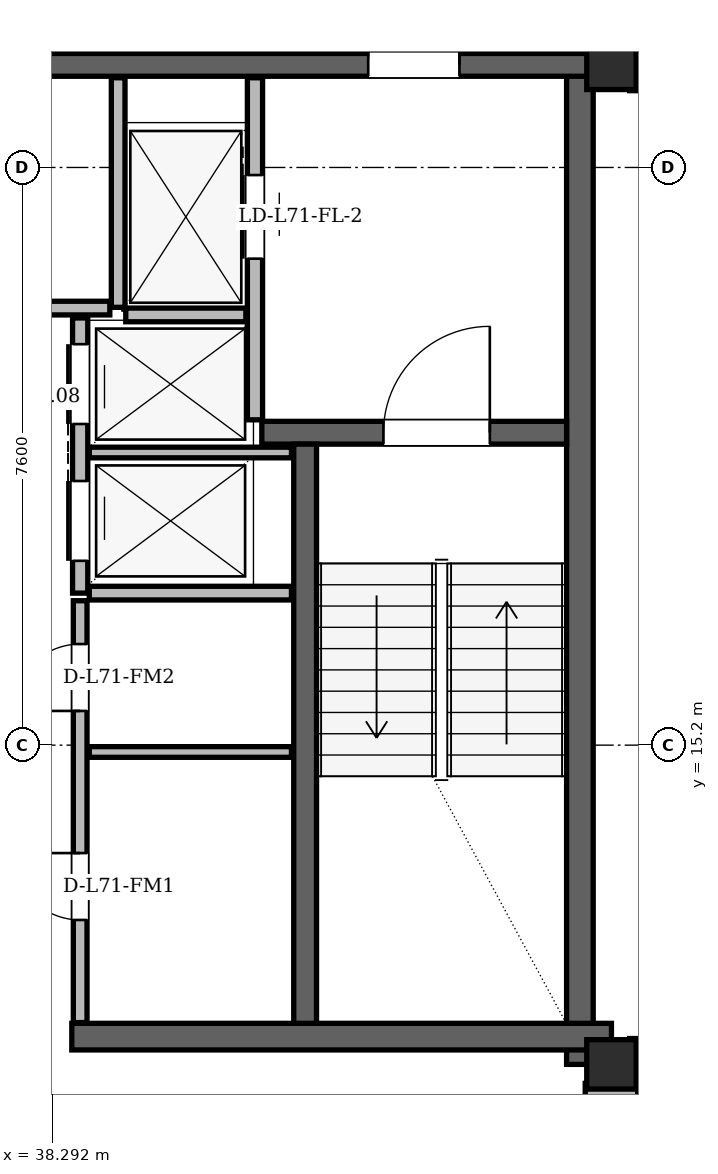
"""IFC4 building model, lengths in metres.
Left out: names, types, materials, properties, quantities, classifications, styles, units other than length and angle.
Written with IfcOpenShell. Run it as: python <this file> out.ifc"""

import sys

from ifc_helpers import new_model, si_unit, direction, frame, frame_2d, origin, origin_2d, place, context, subcontext, project, spatial, rectangle, hollow_rectangle, extrude, element, fill, save


model = new_model("IFC4")
c1 = context("Model", 3, precision=1e-05, world=origin(), true_north=direction((0.0, 1.0)))
c2 = subcontext(c1, "Body", "Model", "MODEL_VIEW")
j1 = project(units=[si_unit("LENGTHUNIT", "METRE"), si_unit("PLANEANGLEUNIT", "RADIAN")], contexts=[c1])
p1 = place(None, origin())
s1 = spatial("IfcSite", under=j1, at=p1, CompositionType="ELEMENT")
p2 = place(p1, origin())
s2 = spatial("IfcBuilding", under=s1, at=p2, CompositionType="ELEMENT")
p3 = place(p2, frame((0.0, 0.0, 269.4)))
s3 = spatial("IfcBuildingStorey", under=s2, at=p3, CompositionType="ELEMENT", Elevation=269.4)
for number, where, z_axis, x_axis in (
    (1, (45.65, 11.0, 0.0), (0.0, 0.0, 1.0), (1.0, 0.0, 0.0)),
    (2, (45.65, 24.15, 0.0), (0.0, 0.0, 1.0), (1.0, 0.0, 0.0)),
):
    element("IfcColumn", number, at=place(p3, frame(where, z_axis=z_axis, x_axis=x_axis)), inside=s3, PredefinedType="COLUMN", context=c2, shape_type="SweptSolid", body=[
        extrude(hollow_rectangle(XDim=0.65, YDim=0.65, WallThickness=0.05, at=origin_2d()), origin(), (0.0, 0.0, 1.0), 3.9),
    ])
p4 = place(p3, frame((45.235, 11.0, 0.0), z_axis=(0.0, 0.0, 1.0), x_axis=(0.0, 1.0, 0.0)))
e3 = element("IfcWall", 3, at=p4, inside=s3, PredefinedType="SHEAR", context=c2, shape_type="SweptSolid", body=[
    extrude(rectangle(XDim=13.3, YDim=0.35, at=frame_2d((6.65, 0.0))), origin(), (0.0, 0.0, 1.0), 3.68),
])
p5 = place(p3, frame((38.55, 11.365, 0.0), z_axis=(0.0, 0.0, 1.0), x_axis=(1.0, 0.0, 0.0)))
e4 = element("IfcWall", 4, at=p5, inside=s3, PredefinedType="SHEAR", context=c2, shape_type="SweptSolid", body=[
    extrude(rectangle(XDim=7.1, YDim=0.35, at=frame_2d((3.55, 0.0))), origin(), (0.0, 0.0, 1.0), 3.68),
])
p6 = place(p3, frame((29.65, 24.15, 0.0), z_axis=(0.0, 0.0, 1.0), x_axis=(1.0, 0.0, 0.0)))
e5 = element("IfcWall", 5, at=p6, inside=s3, PredefinedType="SHEAR", context=c2, shape_type="SweptSolid", body=[
    extrude(rectangle(XDim=15.7, YDim=0.3, at=frame_2d((7.85, 0.0))), origin(), (0.0, 0.0, 1.0), 3.68),
])
p7 = place(p6, frame((1.7, 0.0, 0.0)))
e6 = element("IfcOpeningElement", 6, at=p7, cuts=e5, PredefinedType="OPENING", context=c2, shape_type="SweptSolid", body=[
    extrude(rectangle(XDim=1.2, YDim=2.2, at=frame_2d((0.6, 1.1))), frame((0.0, 0.15, 0.0), z_axis=(0.0, -1.0, 0.0), x_axis=(1.0, 0.0, 0.0)), (0.0, 0.0, 1.0), 0.3),
])
p8 = place(p6, frame((12.8, 0.0, 0.0)))
e7 = element("IfcOpeningElement", 7, at=p8, cuts=e5, PredefinedType="OPENING", context=c2, shape_type="SweptSolid", body=[
    extrude(rectangle(XDim=1.2, YDim=2.2, at=frame_2d((0.6, 1.1))), frame((0.0, 0.15, 0.0), z_axis=(0.0, -1.0, 0.0), x_axis=(1.0, 0.0, 0.0)), (0.0, 0.0, 1.0), 0.3),
])
p9 = place(p6, frame((7.4, 0.0, 0.0)))
e8 = element("IfcOpeningElement", 8, at=p9, cuts=e5, PredefinedType="OPENING", context=c2, shape_type="SweptSolid", body=[
    extrude(rectangle(XDim=0.9, YDim=2.05, at=frame_2d((0.45, 1.025))), frame((0.0, 0.15, 0.0), z_axis=(0.0, -1.0, 0.0), x_axis=(1.0, 0.0, 0.0)), (0.0, 0.0, 1.0), 0.3),
])
p10 = place(p3, frame((41.05, 19.31, 0.0), z_axis=(0.0, 0.0, 1.0), x_axis=(1.0, 0.0, 0.0)))
e9 = element("IfcWall", 9, at=p10, inside=s3, PredefinedType="SHEAR", context=c2, shape_type="SweptSolid", body=[
    extrude(rectangle(XDim=4.01, YDim=0.3, at=frame_2d((2.005, 0.0))), origin(), (0.0, 0.0, 1.0), 3.68),
])
p11 = place(p10, frame((1.6, 0.0, 0.0)))
e10 = element("IfcOpeningElement", 10, at=p11, cuts=e9, PredefinedType="OPENING", context=c2, shape_type="SweptSolid", body=[
    extrude(rectangle(XDim=1.4, YDim=2.2, at=frame_2d((0.7, 1.1))), frame((0.0, 0.15, 0.0), z_axis=(0.0, -1.0, 0.0), x_axis=(1.0, 0.0, 0.0)), (0.0, 0.0, 1.0), 0.3),
])
p12 = place(p3, frame((41.62, 11.54, 0.0), z_axis=(0.0, 0.0, 1.0), x_axis=(0.0, 1.0, 0.0)))
e11 = element("IfcWall", 11, at=p12, inside=s3, PredefinedType="SHEAR", context=c2, shape_type="SweptSolid", body=[
    extrude(rectangle(XDim=7.62, YDim=0.3, at=frame_2d((3.81, 0.0))), origin(), (0.0, 0.0, 1.0), 3.68),
])
p13 = place(p3, frame((58.572, 10.733, 0.0), z_axis=(0.0, 0.0, 1.0), x_axis=(-0.500001430823, 0.866024577697, 0.0)))
e12 = element("IfcWall", 12, at=p13, inside=s3, PredefinedType="SOLIDWALL", context=c2, shape_type="SweptSolid", body=[
    extrude(rectangle(XDim=37.296, YDim=0.29, at=frame_2d((18.648, 0.0))), origin(), (0.0, 0.0, 1.0), 3.058),
])
p14 = place(p13, frame((8.454, 0.0, 0.0)))
e13 = element("IfcOpeningElement", 13, at=p14, cuts=e12, PredefinedType="OPENING", context=c2, shape_type="SweptSolid", body=[
    extrude(rectangle(XDim=1.5, YDim=2.2, at=frame_2d((0.75, 1.1))), frame((0.0, 0.145, 0.0), z_axis=(0.0, -1.0, 0.0), x_axis=(1.0, 0.0, 0.0)), (0.0, 0.0, 1.0), 0.29),
])
p15 = place(p13, frame((28.796, 0.0, 0.0)))
e14 = element("IfcOpeningElement", 14, at=p15, cuts=e12, PredefinedType="OPENING", context=c2, shape_type="SweptSolid", body=[
    extrude(rectangle(XDim=1.5, YDim=2.2, at=frame_2d((0.75, 1.1))), frame((0.0, 0.145, 0.0), z_axis=(0.0, -1.0, 0.0), x_axis=(1.0, 0.0, 0.0)), (0.0, 0.0, 1.0), 0.29),
])
p16 = place(p13, frame((0.77, 0.0, 0.85)))
e15 = element("IfcOpeningElement", 15, at=p16, cuts=e12, PredefinedType="OPENING", context=c2, shape_type="SweptSolid", body=[
    extrude(rectangle(XDim=1.2, YDim=1.48, at=frame_2d((0.6, 0.74))), frame((0.0, 0.145, 0.0), z_axis=(0.0, -1.0, 0.0), x_axis=(1.0, 0.0, 0.0)), (0.0, 0.0, 1.0), 0.29),
])
p17 = place(p13, frame((2.285, 0.0, 0.85)))
e16 = element("IfcOpeningElement", 16, at=p17, cuts=e12, PredefinedType="OPENING", context=c2, shape_type="SweptSolid", body=[
    extrude(rectangle(XDim=1.2, YDim=1.48, at=frame_2d((0.6, 0.74))), frame((0.0, 0.145, 0.0), z_axis=(0.0, -1.0, 0.0), x_axis=(1.0, 0.0, 0.0)), (0.0, 0.0, 1.0), 0.29),
])
p18 = place(p13, frame((6.772, 0.0, 0.85)))
e17 = element("IfcOpeningElement", 17, at=p18, cuts=e12, PredefinedType="OPENING", context=c2, shape_type="SweptSolid", body=[
    extrude(rectangle(XDim=1.2, YDim=1.48, at=frame_2d((0.6, 0.74))), frame((0.0, 0.145, 0.0), z_axis=(0.0, -1.0, 0.0), x_axis=(1.0, 0.0, 0.0)), (0.0, 0.0, 1.0), 0.29),
])
p19 = place(p13, frame((12.682, 0.0, 0.85)))
e18 = element("IfcOpeningElement", 18, at=p19, cuts=e12, PredefinedType="OPENING", context=c2, shape_type="SweptSolid", body=[
    extrude(rectangle(XDim=3.0, YDim=2.098, at=frame_2d((1.5, 1.049))), frame((0.0, 0.145, 0.0), z_axis=(0.0, -1.0, 0.0), x_axis=(1.0, 0.0, 0.0)), (0.0, 0.0, 1.0), 0.29),
])
p20 = place(p13, frame((17.842, 0.0, 0.85)))
e19 = element("IfcOpeningElement", 19, at=p20, cuts=e12, PredefinedType="OPENING", context=c2, shape_type="SweptSolid", body=[
    extrude(rectangle(XDim=2.6, YDim=1.95, at=frame_2d((1.3, 0.975))), frame((0.0, 0.145, 0.0), z_axis=(0.0, -1.0, 0.0), x_axis=(1.0, 0.0, 0.0)), (0.0, 0.0, 1.0), 0.29),
])
p21 = place(p13, frame((35.217, 0.0, 0.85)))
e20 = element("IfcOpeningElement", 20, at=p21, cuts=e12, PredefinedType="OPENING", context=c2, shape_type="SweptSolid", body=[
    extrude(rectangle(XDim=1.2, YDim=1.48, at=frame_2d((0.6, 0.74))), frame((0.0, 0.145, 0.0), z_axis=(0.0, -1.0, 0.0), x_axis=(1.0, 0.0, 0.0)), (0.0, 0.0, 1.0), 0.29),
])
p22 = place(p13, frame((33.737, 0.0, 0.85)))
e21 = element("IfcOpeningElement", 21, at=p22, cuts=e12, PredefinedType="OPENING", context=c2, shape_type="SweptSolid", body=[
    extrude(rectangle(XDim=1.2, YDim=1.48, at=frame_2d((0.6, 0.74))), frame((0.0, 0.145, 0.0), z_axis=(0.0, -1.0, 0.0), x_axis=(1.0, 0.0, 0.0)), (0.0, 0.0, 1.0), 0.29),
])
p23 = place(p13, frame((22.775, 0.0, 0.85)))
e22 = element("IfcOpeningElement", 22, at=p23, cuts=e12, PredefinedType="OPENING", context=c2, shape_type="SweptSolid", body=[
    extrude(rectangle(XDim=1.2, YDim=1.48, at=frame_2d((0.6, 0.74))), frame((0.0, 0.145, 0.0), z_axis=(0.0, -1.0, 0.0), x_axis=(1.0, 0.0, 0.0)), (0.0, 0.0, 1.0), 0.29),
])
p24 = place(p13, frame((31.663, 0.0, 0.85)))
e23 = element("IfcOpeningElement", 23, at=p24, cuts=e12, PredefinedType="OPENING", context=c2, shape_type="SweptSolid", body=[
    extrude(rectangle(XDim=1.2, YDim=1.48, at=frame_2d((0.6, 0.74))), frame((0.0, 0.145, 0.0), z_axis=(0.0, -1.0, 0.0), x_axis=(1.0, 0.0, 0.0)), (0.0, 0.0, 1.0), 0.29),
])
p25 = place(p3, frame((40.96, 19.48, 0.0), z_axis=(0.0, 0.0, 1.0), x_axis=(0.0, 1.0, 0.0)))
e24 = element("IfcWall", 24, at=p25, inside=s3, PredefinedType="PARTITIONING", context=c2, shape_type="SweptSolid", body=[
    extrude(rectangle(XDim=4.5, YDim=0.2, at=frame_2d((2.25, 0.0))), origin(), (0.0, 0.0, 1.0), 3.68),
])
p26 = place(p25, frame((2.12, 0.0, 0.0)))
e25 = element("IfcOpeningElement", 25, at=p26, cuts=e24, PredefinedType="OPENING", context=c2, shape_type="SweptSolid", body=[
    extrude(rectangle(XDim=1.1, YDim=2.2, at=frame_2d((0.55, 1.1))), frame((0.0, 0.1, 0.0), z_axis=(0.0, -1.0, 0.0), x_axis=(1.0, 0.0, 0.0)), (0.0, 0.0, 1.0), 0.2),
])
p27 = place(p3, frame((39.16, 20.96, 0.0), z_axis=(0.0, 0.0, 1.0), x_axis=(0.0, 1.0, 0.0)))
e26 = element("IfcWall", 26, at=p27, inside=s3, PredefinedType="PARTITIONING", context=c2, shape_type="SweptSolid", body=[
    extrude(rectangle(XDim=3.02, YDim=0.18, at=frame_2d((1.51, 0.0))), origin(), (0.0, 0.0, 1.0), 3.68),
])
p28 = place(p3, frame((39.26, 20.86, 0.0), z_axis=(0.0, 0.0, 1.0), x_axis=(1.0, 0.0, 0.0)))
e27 = element("IfcWall", 27, at=p28, inside=s3, PredefinedType="PARTITIONING", context=c2, shape_type="SweptSolid", body=[
    extrude(rectangle(XDim=1.58, YDim=0.18, at=frame_2d((0.79, 0.0))), origin(), (0.0, 0.0, 1.0), 3.68),
])
p29 = place(p3, frame((38.66, 17.2, 0.0), z_axis=(0.0, 0.0, 1.0), x_axis=(0.0, 1.0, 0.0)))
e28 = element("IfcWall", 28, at=p29, inside=s3, PredefinedType="PARTITIONING", context=c2, shape_type="SweptSolid", body=[
    extrude(rectangle(XDim=3.62, YDim=0.2, at=frame_2d((1.81, 0.0))), origin(), (0.0, 0.0, 1.0), 3.68),
])
p30 = place(p29, frame((0.425, 0.0, 0.0)))
e29 = element("IfcOpeningElement", 29, at=p30, cuts=e28, PredefinedType="OPENING", context=c2, shape_type="SweptSolid", body=[
    extrude(rectangle(XDim=1.05, YDim=2.15, at=frame_2d((0.525, 1.075))), frame((0.0, 0.1, 0.0), z_axis=(0.0, -1.0, 0.0), x_axis=(1.0, 0.0, 0.0)), (0.0, 0.0, 1.0), 0.2),
])
p31 = place(p29, frame((2.225, 0.0, 0.0)))
e30 = element("IfcOpeningElement", 30, at=p31, cuts=e28, PredefinedType="OPENING", context=c2, shape_type="SweptSolid", body=[
    extrude(rectangle(XDim=1.05, YDim=2.15, at=frame_2d((0.525, 1.075))), frame((0.0, 0.1, 0.0), z_axis=(0.0, -1.0, 0.0), x_axis=(1.0, 0.0, 0.0)), (0.0, 0.0, 1.0), 0.2),
])
p32 = place(p3, frame((38.78, 17.2, 0.0), z_axis=(0.0, 0.0, 1.0), x_axis=(1.0, 0.0, 0.0)))
e31 = element("IfcWall", 31, at=p32, inside=s3, PredefinedType="PARTITIONING", context=c2, shape_type="SweptSolid", body=[
    extrude(rectangle(XDim=2.66, YDim=0.18, at=frame_2d((1.33, 0.0))), origin(), (0.0, 0.0, 1.0), 3.68),
])
p33 = place(p3, frame((38.78, 19.05, 0.0), z_axis=(0.0, 0.0, 1.0), x_axis=(1.0, 0.0, 0.0)))
e32 = element("IfcWall", 32, at=p33, inside=s3, PredefinedType="PARTITIONING", context=c2, shape_type="SweptSolid", body=[
    extrude(rectangle(XDim=2.66, YDim=0.14, at=frame_2d((1.33, 0.0))), origin(), (0.0, 0.0, 1.0), 3.68),
])
p34 = place(p3, frame((38.66, 11.55, 0.0), z_axis=(0.0, 0.0, 1.0), x_axis=(0.0, 1.0, 0.0)))
e33 = element("IfcWall", 33, at=p34, inside=s3, PredefinedType="PARTITIONING", context=c2, shape_type="SweptSolid", body=[
    extrude(rectangle(XDim=5.55, YDim=0.18, at=frame_2d((2.775, 0.0))), origin(), (0.0, 0.0, 1.0), 3.68),
])
p35 = place(p34, frame((1.35, 0.0, 0.0)))
e34 = element("IfcOpeningElement", 34, at=p35, cuts=e33, PredefinedType="OPENING", context=c2, shape_type="SweptSolid", body=[
    extrude(rectangle(XDim=0.88, YDim=2.08, at=frame_2d((0.44, 1.04))), frame((0.0, 0.09, 0.0), z_axis=(0.0, -1.0, 0.0), x_axis=(1.0, 0.0, 0.0)), (0.0, 0.0, 1.0), 0.18),
])
p36 = place(p34, frame((4.1, 0.0, 0.0)))
e35 = element("IfcOpeningElement", 35, at=p36, cuts=e33, PredefinedType="OPENING", context=c2, shape_type="SweptSolid", body=[
    extrude(rectangle(XDim=0.88, YDim=2.08, at=frame_2d((0.44, 1.04))), frame((0.0, 0.09, 0.0), z_axis=(0.0, -1.0, 0.0), x_axis=(1.0, 0.0, 0.0)), (0.0, 0.0, 1.0), 0.18),
])
p37 = place(p3, frame((38.78, 15.11, 0.0), z_axis=(0.0, 0.0, 1.0), x_axis=(1.0, 0.0, 0.0)))
e36 = element("IfcWall", 36, at=p37, inside=s3, PredefinedType="PARTITIONING", context=c2, shape_type="SweptSolid", body=[
    extrude(rectangle(XDim=2.66, YDim=0.14, at=frame_2d((1.33, 0.0))), origin(), (0.0, 0.0, 1.0), 3.68),
])
p38 = place(p3, frame((35.95, 20.95, 0.0), z_axis=(0.0, 0.0, 1.0), x_axis=(1.0, 0.0, 0.0)))
e37 = element("IfcWall", 37, at=p38, inside=s3, PredefinedType="PARTITIONING", context=c2, shape_type="SweptSolid", body=[
    extrude(rectangle(XDim=3.1, YDim=0.18, at=frame_2d((1.55, 0.0))), origin(), (0.0, 0.0, 1.0), 3.68),
])
p39 = place(p3, frame((45.305, 10.65, 0.0), z_axis=(0.0, 0.0, 1.0), x_axis=(1.0, 0.0, 0.0)))
e38 = element("IfcWall", 38, at=p39, inside=s3, PredefinedType="PARTITIONING", context=c2, shape_type="SweptSolid", body=[
    extrude(rectangle(XDim=0.69, YDim=0.2, at=frame_2d((0.345, 0.0))), origin(), (0.0, 0.0, 1.0), 3.68),
])
p40 = place(p3, frame((45.99, 10.95, 0.0), z_axis=(0.0, 0.0, 1.0), x_axis=(0.0, 1.0, 0.0)))
e39 = element("IfcWall", 39, at=p40, inside=s3, PredefinedType="PARTITIONING", context=c2, shape_type="SweptSolid", body=[
    extrude(rectangle(XDim=0.39, YDim=0.2, at=frame_2d((0.195, 0.0))), origin(), (0.0, 0.0, 1.0), 3.68),
])
p41 = place(p3, frame((45.99, 23.81, 0.0), z_axis=(0.0, 0.0, 1.0), x_axis=(0.0, 1.0, 0.0)))
e40 = element("IfcWall", 40, at=p41, inside=s3, PredefinedType="PARTITIONING", context=c2, shape_type="SweptSolid", body=[
    extrude(rectangle(XDim=0.51, YDim=0.2, at=frame_2d((0.255, 0.0))), origin(), (0.0, 0.0, 1.0), 3.68),
])
p42 = place(p35, origin())
e41 = element("IfcDoor", 41, at=p42, inside=s3, OperationType="SINGLE_SWING_RIGHT", PredefinedType="DOOR", context=c2, shape_type="SweptSolid", body=[
    extrude(rectangle(XDim=0.88, YDim=2.08, at=frame_2d((0.44, 1.04))), frame((0.0, 0.025, 0.0), z_axis=(0.0, -1.0, 0.0), x_axis=(1.0, 0.0, 0.0)), (0.0, 0.0, 1.0), 0.05),
])
fill(e34, e41)
p43 = place(p36, origin())
e42 = element("IfcDoor", 42, at=p43, inside=s3, OperationType="SINGLE_SWING_LEFT", PredefinedType="DOOR", context=c2, shape_type="SweptSolid", body=[
    extrude(rectangle(XDim=0.88, YDim=2.08, at=frame_2d((0.44, 1.04))), frame((0.0, 0.025, 0.0), z_axis=(0.0, -1.0, 0.0), x_axis=(1.0, 0.0, 0.0)), (0.0, 0.0, 1.0), 0.05),
])
fill(e35, e42)
p44 = place(p26, origin())
e43 = element("IfcDoor", 43, at=p44, inside=s3, OperationType="SLIDING_TO_RIGHT", PredefinedType="DOOR", context=c2, shape_type="SweptSolid", body=[
    extrude(rectangle(XDim=1.1, YDim=2.2, at=frame_2d((0.55, 1.1))), frame((0.0, 0.025, 0.0), z_axis=(0.0, -1.0, 0.0), x_axis=(1.0, 0.0, 0.0)), (0.0, 0.0, 1.0), 0.05),
])
fill(e25, e43)
p45 = place(p30, origin())
e44 = element("IfcDoor", 44, at=p45, inside=s3, OperationType="SLIDING_TO_RIGHT", PredefinedType="DOOR", context=c2, shape_type="SweptSolid", body=[
    extrude(rectangle(XDim=1.05, YDim=2.15, at=frame_2d((0.525, 1.075))), frame((0.0, 0.025, 0.0), z_axis=(0.0, -1.0, 0.0), x_axis=(1.0, 0.0, 0.0)), (0.0, 0.0, 1.0), 0.05),
])
fill(e29, e44)
p46 = place(p31, origin())
e45 = element("IfcDoor", 45, at=p46, inside=s3, OperationType="SLIDING_TO_LEFT", PredefinedType="DOOR", context=c2, shape_type="SweptSolid", body=[
    extrude(rectangle(XDim=1.05, YDim=2.15, at=frame_2d((0.525, 1.075))), frame((0.0, 0.025, 0.0), z_axis=(0.0, -1.0, 0.0), x_axis=(1.0, 0.0, 0.0)), (0.0, 0.0, 1.0), 0.05),
])
fill(e30, e45)
p47 = place(p11, origin())
e46 = element("IfcDoor", 46, at=p47, inside=s3, OperationType="SINGLE_SWING_RIGHT", PredefinedType="DOOR", context=c2, shape_type="SweptSolid", body=[
    extrude(rectangle(XDim=1.4, YDim=2.2, at=frame_2d((0.7, 1.1))), frame((0.0, 0.025, 0.0), z_axis=(0.0, -1.0, 0.0), x_axis=(1.0, 0.0, 0.0)), (0.0, 0.0, 1.0), 0.05),
])
fill(e10, e46)
p48 = place(p8, origin())
e47 = element("IfcDoor", 47, at=p48, inside=s3, OperationType="SINGLE_SWING_RIGHT", PredefinedType="DOOR", context=c2, shape_type="SweptSolid", body=[
    extrude(rectangle(XDim=1.2, YDim=2.2, at=frame_2d((0.6, 1.1))), frame((0.0, 0.025, 0.0), z_axis=(0.0, -1.0, 0.0), x_axis=(1.0, 0.0, 0.0)), (0.0, 0.0, 1.0), 0.05),
])
fill(e7, e47)
save(model, sys.argv[1])
